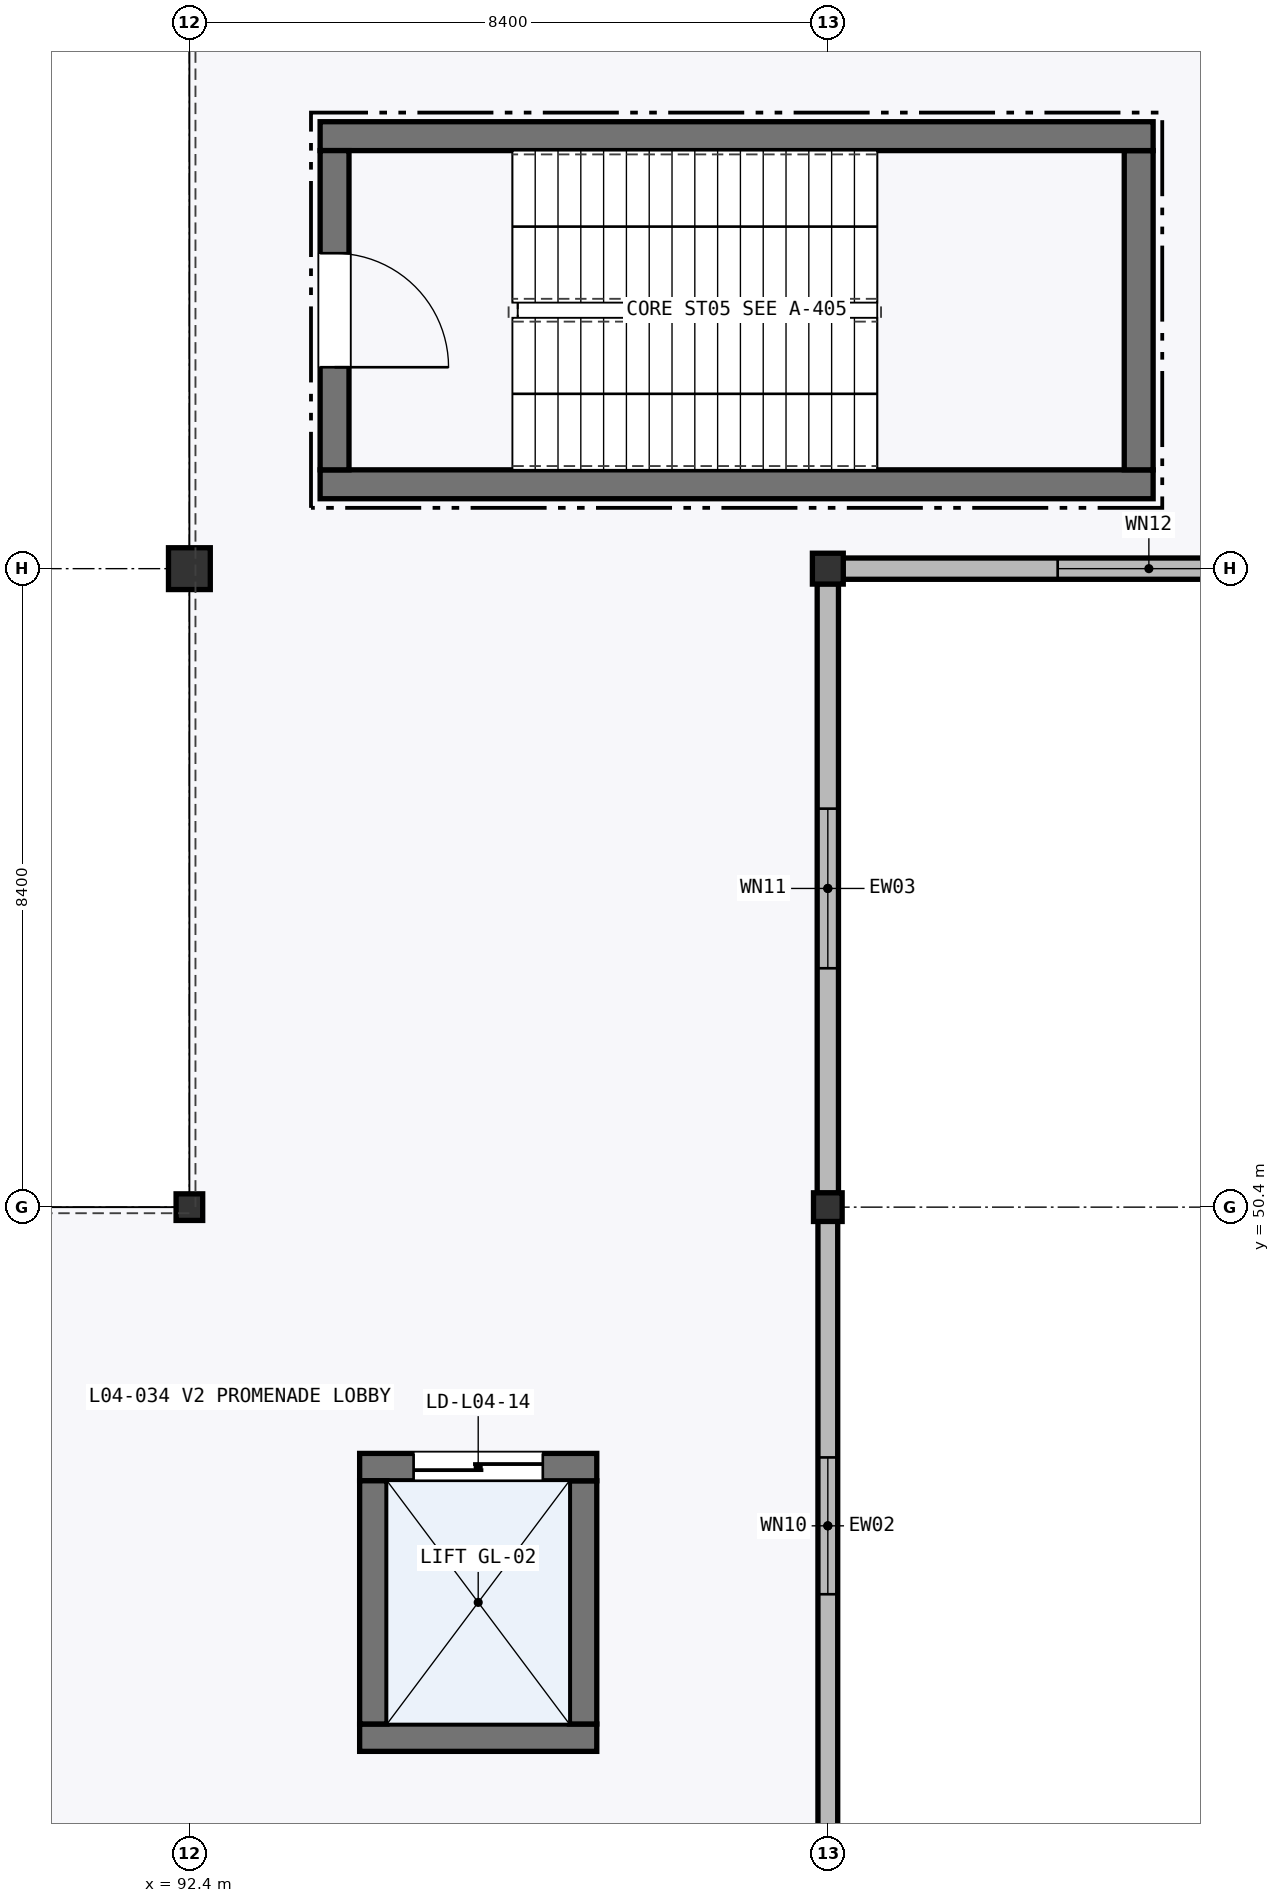
"""IFC4 building model, lengths in metres.
Left out: names, types, materials, properties, quantities, classifications, styles, units other than length and angle.
Written with IfcOpenShell. Run it as: python <this file> out.ifc"""

import sys

from ifc_helpers import new_model, si_unit, direction, frame, frame_2d, origin, origin_2d, place, context, subcontext, project, spatial, rectangle, hollow_rectangle, hollow_circle, i_section, extrude, element, fill, save


model = new_model("IFC4")
c1 = context("Model", 3, precision=1e-05, world=origin(), true_north=direction((0.0, 1.0)))
c2 = subcontext(c1, "Body", "Model", "MODEL_VIEW")
j1 = project(units=[si_unit("LENGTHUNIT", "METRE"), si_unit("PLANEANGLEUNIT", "RADIAN")], contexts=[c1])
p1 = place(None, origin())
s1 = spatial("IfcSite", under=j1, at=p1, CompositionType="ELEMENT")
p2 = place(p1, origin())
s2 = spatial("IfcBuilding", under=s1, at=p2, CompositionType="ELEMENT")
p3 = place(p2, frame((0.0, 0.0, 16.5)))
s3 = spatial("IfcBuildingStorey", under=s2, at=p3, CompositionType="ELEMENT", Elevation=16.5)
p4 = place(p3, frame((92.4, 50.4, 0.0), z_axis=(0.0, 0.0, 1.0), x_axis=(1.0, 0.0, 0.0)))
e1 = element("IfcColumn", 1, at=p4, inside=s3, PredefinedType="COLUMN", context=c2, shape_type="SweptSolid", body=[
    extrude(i_section(OverallWidth=0.35, OverallDepth=0.35, WebThickness=0.012, FlangeThickness=0.019, FilletRadius=0.02, at=origin_2d()), origin(), (0.0, 0.0, 1.0), 5.1),
])
p5 = place(p3, frame((92.4, 58.8, 0.0), z_axis=(0.0, 0.0, 1.0), x_axis=(1.0, 0.0, 0.0)))
e2 = element("IfcColumn", 2, at=p5, inside=s3, PredefinedType="COLUMN", context=c2, shape_type="SweptSolid", body=[
    extrude(hollow_rectangle(XDim=0.55, YDim=0.55, WallThickness=0.022, at=origin_2d()), origin(), (0.0, 0.0, 1.0), 5.1),
])
p6 = place(p3, frame((100.8, 50.4, 0.0), z_axis=(0.0, 0.0, 1.0), x_axis=(1.0, 0.0, 0.0)))
e3 = element("IfcColumn", 3, at=p6, inside=s3, PredefinedType="COLUMN", context=c2, shape_type="SweptSolid", body=[
    extrude(hollow_circle(Radius=0.188, WallThickness=0.014, at=origin_2d()), origin(), (0.0, 0.0, 1.0), 5.1),
])
p7 = place(p3, frame((100.8, 58.8, 0.0), z_axis=(0.0, 0.0, 1.0), x_axis=(1.0, 0.0, 0.0)))
e4 = element("IfcColumn", 4, at=p7, inside=s3, PredefinedType="COLUMN", context=c2, shape_type="SweptSolid", body=[
    extrude(hollow_circle(Radius=0.203, WallThickness=0.016, at=origin_2d()), origin(), (0.0, 0.0, 1.0), 5.1),
])
p8 = place(p3, frame((100.8, 42.198, 0.0), z_axis=(0.0, 0.0, 1.0), x_axis=(0.0, 1.0, 0.0)))
e5 = element("IfcWall", 5, at=p8, inside=s3, PredefinedType="STANDARD", context=c2, shape_type="SweptSolid", body=[
    extrude(rectangle(XDim=8.019, YDim=0.26, at=frame_2d((4.009, 0.0))), origin(), (0.0, 0.0, 1.0), 4.32),
])
p9 = place(p8, frame((3.109, 0.0, 0.95)))
e6 = element("IfcOpeningElement", 6, at=p9, cuts=e5, PredefinedType="OPENING", context=c2, shape_type="SweptSolid", body=[
    extrude(rectangle(XDim=1.8, YDim=2.1, at=frame_2d((0.9, 1.05))), frame((0.0, 0.14, 0.0), z_axis=(0.0, -1.0, 0.0), x_axis=(1.0, 0.0, 0.0)), (0.0, 0.0, 1.0), 0.28),
])
p10 = place(p3, frame((100.8, 50.583, 0.0), z_axis=(0.0, 0.0, 1.0), x_axis=(0.0, 1.0, 0.0)))
e7 = element("IfcWall", 7, at=p10, inside=s3, PredefinedType="STANDARD", context=c2, shape_type="SweptSolid", body=[
    extrude(rectangle(XDim=8.019, YDim=0.28, at=frame_2d((4.009, 0.0))), origin(), (0.0, 0.0, 1.0), 4.331),
])
p11 = place(p10, frame((2.959, 0.0, 0.95)))
e8 = element("IfcOpeningElement", 8, at=p11, cuts=e7, PredefinedType="OPENING", context=c2, shape_type="SweptSolid", body=[
    extrude(rectangle(XDim=2.1, YDim=2.1, at=frame_2d((1.05, 1.05))), frame((0.0, 0.15, 0.0), z_axis=(0.0, -1.0, 0.0), x_axis=(1.0, 0.0, 0.0)), (0.0, 0.0, 1.0), 0.3),
])
p12 = place(p3, frame((100.998, 58.8, 0.0), z_axis=(0.0, 0.0, 1.0), x_axis=(1.0, 0.0, 0.0)))
e9 = element("IfcWall", 9, at=p12, inside=s3, PredefinedType="STANDARD", context=c2, shape_type="SweptSolid", body=[
    extrude(rectangle(XDim=8.052, YDim=0.28, at=frame_2d((4.026, 0.0))), origin(), (0.0, 0.0, 1.0), 4.331),
])
p13 = place(p12, frame((2.826, 0.0, 0.95)))
e10 = element("IfcOpeningElement", 10, at=p13, cuts=e9, PredefinedType="OPENING", context=c2, shape_type="SweptSolid", body=[
    extrude(rectangle(XDim=2.4, YDim=2.1, at=frame_2d((1.2, 1.05))), frame((0.0, 0.15, 0.0), z_axis=(0.0, -1.0, 0.0), x_axis=(1.0, 0.0, 0.0)), (0.0, 0.0, 1.0), 0.3),
])
p14 = place(p3, frame((94.12, 59.91, 0.0), z_axis=(0.0, 0.0, 1.0), x_axis=(1.0, 0.0, 0.0)))
e11 = element("IfcWall", 11, at=p14, inside=s3, PredefinedType="SHEAR", context=c2, shape_type="SweptSolid", body=[
    extrude(rectangle(XDim=10.96, YDim=0.38, at=frame_2d((5.48, 0.0))), origin(), (0.0, 0.0, 1.0), 4.845),
])
p15 = place(p3, frame((104.89, 60.1, 0.0), z_axis=(0.0, 0.0, 1.0), x_axis=(0.0, 1.0, 0.0)))
e12 = element("IfcWall", 12, at=p15, inside=s3, PredefinedType="SHEAR", context=c2, shape_type="SweptSolid", body=[
    extrude(rectangle(XDim=4.2, YDim=0.38, at=frame_2d((2.1, 0.0))), origin(), (0.0, 0.0, 1.0), 4.845),
])
p16 = place(p3, frame((105.08, 64.49, 0.0), z_axis=(0.0, 0.0, 1.0), x_axis=(-1.0, 0.0, 0.0)))
e13 = element("IfcWall", 13, at=p16, inside=s3, PredefinedType="SHEAR", context=c2, shape_type="SweptSolid", body=[
    extrude(rectangle(XDim=10.96, YDim=0.38, at=frame_2d((5.48, 0.0))), origin(), (0.0, 0.0, 1.0), 4.845),
])
p17 = place(p3, frame((94.31, 64.3, 0.0), z_axis=(0.0, 0.0, 1.0), x_axis=(0.0, -1.0, 0.0)))
e14 = element("IfcWall", 14, at=p17, inside=s3, PredefinedType="SHEAR", context=c2, shape_type="SweptSolid", body=[
    extrude(rectangle(XDim=4.2, YDim=0.38, at=frame_2d((2.1, 0.0))), origin(), (0.0, 0.0, 1.0), 4.845),
])
p18 = place(p17, frame((1.35, 0.0, 0.0)))
e15 = element("IfcOpeningElement", 15, at=p18, cuts=e14, PredefinedType="OPENING", context=c2, shape_type="SweptSolid", body=[
    extrude(rectangle(XDim=1.5, YDim=2.15, at=frame_2d((0.75, 1.075))), frame((0.0, 0.2, 0.0), z_axis=(0.0, -1.0, 0.0), x_axis=(1.0, 0.0, 0.0)), (0.0, 0.0, 1.0), 0.4),
])
p19 = place(p3, frame((94.64, 43.42, 0.0), z_axis=(0.0, 0.0, 1.0), x_axis=(1.0, 0.0, 0.0)))
e16 = element("IfcWall", 16, at=p19, inside=s3, PredefinedType="SHEAR", context=c2, shape_type="SweptSolid", body=[
    extrude(rectangle(XDim=3.12, YDim=0.36, at=frame_2d((1.56, 0.0))), origin(), (0.0, 0.0, 1.0), 4.095),
])
p20 = place(p3, frame((97.58, 43.6, 0.0), z_axis=(0.0, 0.0, 1.0), x_axis=(0.0, 1.0, 0.0)))
e17 = element("IfcWall", 17, at=p20, inside=s3, PredefinedType="SHEAR", context=c2, shape_type="SweptSolid", body=[
    extrude(rectangle(XDim=3.2, YDim=0.36, at=frame_2d((1.6, 0.0))), origin(), (0.0, 0.0, 1.0), 4.095),
])
p21 = place(p3, frame((97.76, 46.98, 0.0), z_axis=(0.0, 0.0, 1.0), x_axis=(-1.0, 0.0, 0.0)))
e18 = element("IfcWall", 18, at=p21, inside=s3, PredefinedType="SHEAR", context=c2, shape_type="SweptSolid", body=[
    extrude(rectangle(XDim=3.12, YDim=0.36, at=frame_2d((1.56, 0.0))), origin(), (0.0, 0.0, 1.0), 4.095),
])
p22 = place(p21, frame((0.71, 0.0, 0.0)))
e19 = element("IfcOpeningElement", 19, at=p22, cuts=e18, PredefinedType="OPENING", context=c2, shape_type="SweptSolid", body=[
    extrude(rectangle(XDim=1.7, YDim=2.3, at=frame_2d((0.85, 1.15))), frame((0.0, 0.19, 0.0), z_axis=(0.0, -1.0, 0.0), x_axis=(1.0, 0.0, 0.0)), (0.0, 0.0, 1.0), 0.38),
])
p23 = place(p3, frame((94.82, 46.8, 0.0), z_axis=(0.0, 0.0, 1.0), x_axis=(0.0, -1.0, 0.0)))
e20 = element("IfcWall", 20, at=p23, inside=s3, PredefinedType="SHEAR", context=c2, shape_type="SweptSolid", body=[
    extrude(rectangle(XDim=3.2, YDim=0.36, at=frame_2d((1.6, 0.0))), origin(), (0.0, 0.0, 1.0), 4.095),
])
p24 = place(p9, origin())
e21 = element("IfcWindow", 21, at=p24, inside=s3, PartitioningType="SINGLE_PANEL", PredefinedType="WINDOW", context=c2, shape_type="SweptSolid", body=[
    extrude(rectangle(XDim=1.8, YDim=2.1, at=frame_2d((0.9, 1.05))), frame((0.0, 0.03, 0.0), z_axis=(0.0, -1.0, 0.0), x_axis=(1.0, 0.0, 0.0)), (0.0, 0.0, 1.0), 0.06),
])
fill(e6, e21)
p25 = place(p11, origin())
e22 = element("IfcWindow", 22, at=p25, inside=s3, PartitioningType="SINGLE_PANEL", PredefinedType="WINDOW", context=c2, shape_type="SweptSolid", body=[
    extrude(rectangle(XDim=2.1, YDim=2.1, at=frame_2d((1.05, 1.05))), frame((0.0, 0.03, 0.0), z_axis=(0.0, -1.0, 0.0), x_axis=(1.0, 0.0, 0.0)), (0.0, 0.0, 1.0), 0.06),
])
fill(e8, e22)
p26 = place(p13, origin())
e23 = element("IfcWindow", 23, at=p26, inside=s3, PartitioningType="SINGLE_PANEL", PredefinedType="WINDOW", context=c2, shape_type="SweptSolid", body=[
    extrude(rectangle(XDim=2.4, YDim=2.1, at=frame_2d((1.2, 1.05))), frame((0.0, 0.03, 0.0), z_axis=(0.0, -1.0, 0.0), x_axis=(1.0, 0.0, 0.0)), (0.0, 0.0, 1.0), 0.06),
])
fill(e10, e23)
p27 = place(p18, origin())
e24 = element("IfcDoor", 24, at=p27, inside=s3, OperationType="SINGLE_SWING_RIGHT", PredefinedType="DOOR", context=c2, shape_type="SweptSolid", body=[
    extrude(rectangle(XDim=1.5, YDim=2.15, at=frame_2d((0.75, 1.075))), frame((0.0, 0.025, 0.0), z_axis=(0.0, -1.0, 0.0), x_axis=(1.0, 0.0, 0.0)), (0.0, 0.0, 1.0), 0.05),
])
fill(e15, e24)
p28 = place(p22, frame((1.7, 0.0, 0.0), z_axis=(0.0, 0.0, 1.0), x_axis=(-1.0, 0.0, 0.0)))
e25 = element("IfcDoor", 25, at=p28, inside=s3, OperationType="DOUBLE_DOOR_SLIDING", PredefinedType="DOOR", context=c2, shape_type="SweptSolid", body=[
    extrude(rectangle(XDim=1.7, YDim=2.3, at=frame_2d((0.85, 1.15))), frame((0.0, 0.025, 0.0), z_axis=(0.0, -1.0, 0.0), x_axis=(1.0, 0.0, 0.0)), (0.0, 0.0, 1.0), 0.05),
])
fill(e19, e25)
save(model, sys.argv[1])
